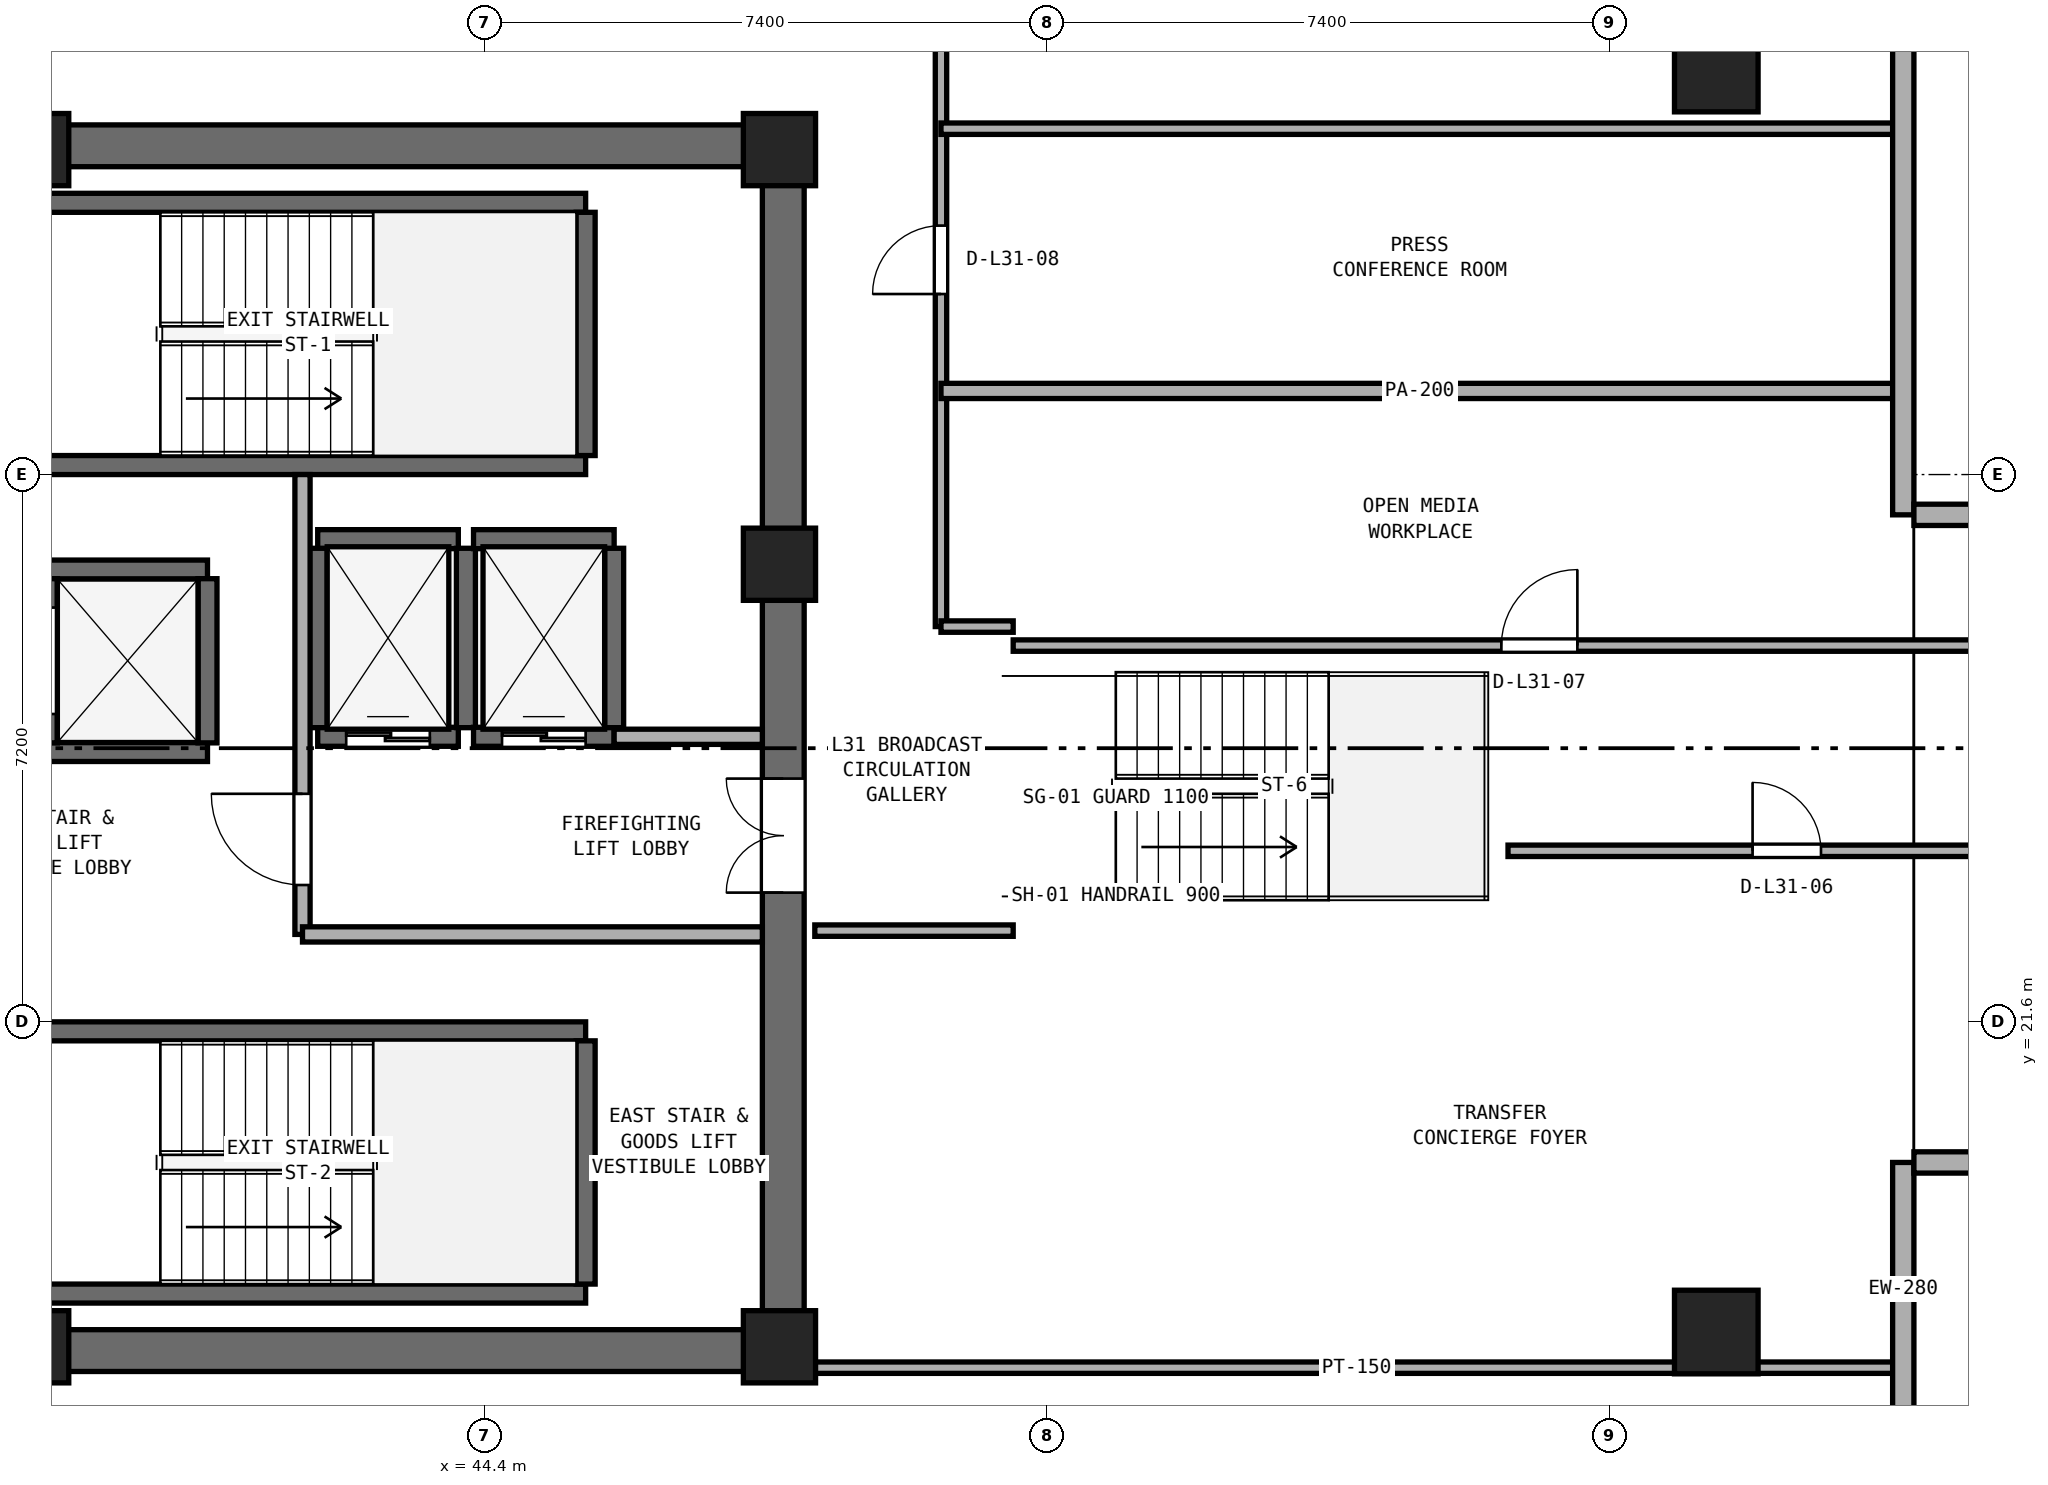
"""IFC4 building model, lengths in metres.
Left out: names, types, materials, properties, quantities, classifications, styles, units other than length and angle.
Written with IfcOpenShell. Run it as: python <this file> out.ifc"""

import sys

from ifc_helpers import new_model, si_unit, direction, frame, frame_2d, origin, origin_2d, place, context, subcontext, project, spatial, rectangle, extrude, element, fill, save


model = new_model("IFC4")
c1 = context("Model", 3, precision=1e-05, world=origin(), true_north=direction((0.0, 1.0)))
c2 = subcontext(c1, "Body", "Model", "MODEL_VIEW")
j1 = project(units=[si_unit("LENGTHUNIT", "METRE"), si_unit("PLANEANGLEUNIT", "RADIAN")], contexts=[c1])
p1 = place(None, origin())
s1 = spatial("IfcSite", under=j1, at=p1, CompositionType="ELEMENT")
p2 = place(p1, origin())
s2 = spatial("IfcBuilding", under=s1, at=p2, CompositionType="ELEMENT")
p3 = place(p2, frame((0.0, 0.0, 125.0)))
s3 = spatial("IfcBuildingStorey", under=s2, at=p3, CompositionType="ELEMENT", Elevation=125.0)
for number, where, z_axis, x_axis in (
    (1, (25.4, 17.275, 0.0), (0.0, 0.0, 1.0), (1.0, 0.0, 0.0)),
    (2, (25.4, 33.125, 0.0), (0.0, 0.0, 1.0), (1.0, 0.0, 0.0)),
):
    element("IfcWall", number, at=place(p3, frame(where, z_axis=z_axis, x_axis=x_axis)), inside=s3, PredefinedType="SHEAR", context=c2, shape_type="SweptSolid", body=[
        extrude(rectangle(XDim=23.2, YDim=0.55, at=frame_2d((11.6, 0.0))), origin(), (0.0, 0.0, 1.0), 3.54),
    ])
p4 = place(p3, frame((48.325, 17.55, 0.0), z_axis=(0.0, 0.0, 1.0), x_axis=(0.0, 1.0, 0.0)))
e3 = element("IfcWall", 3, at=p4, inside=s3, PredefinedType="SHEAR", context=c2, shape_type="SweptSolid", body=[
    extrude(rectangle(XDim=15.3, YDim=0.55, at=frame_2d((7.65, 0.0))), origin(), (0.0, 0.0, 1.0), 3.54),
])
p5 = place(p4, frame((5.75, 0.0, 0.0)))
e4 = element("IfcOpeningElement", 4, at=p5, cuts=e3, PredefinedType="OPENING", context=c2, shape_type="SweptSolid", body=[
    extrude(rectangle(XDim=1.5, YDim=2.15, at=frame_2d((0.75, 1.075))), frame((0.0, 0.285, 0.0), z_axis=(0.0, -1.0, 0.0), x_axis=(1.0, 0.0, 0.0)), (0.0, 0.0, 1.0), 0.57),
])
for number, where, z_axis, x_axis in (
    (5, (38.45, 17.325, 0.0), (0.0, 0.0, 1.0), (1.0, 0.0, 0.0)),
    (6, (48.275, 17.325, 0.0), (0.0, 0.0, 1.0), (1.0, 0.0, 0.0)),
    (7, (48.275, 27.62, 0.0), (0.0, 0.0, 1.0), (1.0, 0.0, 0.0)),
    (8, (48.275, 33.075, 0.0), (0.0, 0.0, 1.0), (1.0, 0.0, 0.0)),
    (9, (38.45, 33.075, 0.0), (0.0, 0.0, 1.0), (1.0, 0.0, 0.0)),
):
    element("IfcColumn", number, at=place(p3, frame(where, z_axis=z_axis, x_axis=x_axis)), inside=s3, PredefinedType="PILASTER", context=c2, shape_type="SweptSolid", body=[
        extrude(rectangle(XDim=0.95, YDim=0.95, at=origin_2d()), origin(), (0.0, 0.0, 1.0), 3.8),
    ])
for number, where, z_axis, x_axis in (
    (10, (60.6, 17.519, 0.0), (0.0, 0.0, 1.0), (1.0, 0.0, 0.0)),
    (11, (60.6, 34.122, 0.0), (0.0, 0.0, 1.0), (1.0, 0.0, 0.0)),
):
    element("IfcColumn", number, at=place(p3, frame(where, z_axis=z_axis, x_axis=x_axis)), inside=s3, PredefinedType="COLUMN", context=c2, shape_type="SweptSolid", body=[
        extrude(rectangle(XDim=1.1, YDim=1.1, at=origin_2d()), origin(), (0.0, 0.0, 1.0), 3.8),
    ])
for number, where, z_axis, x_axis in (
    (12, (38.425, 28.925, 0.0), (0.0, 0.0, 1.0), (1.0, 0.0, 0.0)),
    (13, (38.425, 32.375, 0.0), (0.0, 0.0, 1.0), (1.0, 0.0, 0.0)),
):
    element("IfcWall", number, at=place(p3, frame(where, z_axis=z_axis, x_axis=x_axis)), inside=s3, PredefinedType="SHEAR", context=c2, shape_type="SweptSolid", body=[
        extrude(rectangle(XDim=7.3, YDim=0.25, at=frame_2d((3.65, 0.0))), origin(), (0.0, 0.0, 1.0), 3.54),
    ])
p6 = place(p3, frame((45.725, 29.05, 0.0), z_axis=(0.0, 0.0, 1.0), x_axis=(0.0, 1.0, 0.0)))
e14 = element("IfcWall", 14, at=p6, inside=s3, PredefinedType="SHEAR", context=c2, shape_type="SweptSolid", body=[
    extrude(rectangle(XDim=3.2, YDim=0.25, at=frame_2d((1.6, 0.0))), origin(), (0.0, 0.0, 1.0), 3.54),
])
for number, where, z_axis, x_axis in (
    (15, (38.425, 18.025, 0.0), (0.0, 0.0, 1.0), (1.0, 0.0, 0.0)),
    (16, (38.425, 21.475, 0.0), (0.0, 0.0, 1.0), (1.0, 0.0, 0.0)),
):
    element("IfcWall", number, at=place(p3, frame(where, z_axis=z_axis, x_axis=x_axis)), inside=s3, PredefinedType="SHEAR", context=c2, shape_type="SweptSolid", body=[
        extrude(rectangle(XDim=7.3, YDim=0.25, at=frame_2d((3.65, 0.0))), origin(), (0.0, 0.0, 1.0), 3.54),
    ])
p7 = place(p3, frame((45.725, 18.15, 0.0), z_axis=(0.0, 0.0, 1.0), x_axis=(0.0, 1.0, 0.0)))
e17 = element("IfcWall", 17, at=p7, inside=s3, PredefinedType="SHEAR", context=c2, shape_type="SweptSolid", body=[
    extrude(rectangle(XDim=3.2, YDim=0.25, at=frame_2d((1.6, 0.0))), origin(), (0.0, 0.0, 1.0), 3.54),
])
p8 = place(p3, frame((42.2, 25.35, 0.0), z_axis=(0.0, 0.0, 1.0), x_axis=(1.0, 0.0, 0.0)))
e18 = element("IfcWall", 18, at=p8, inside=s3, PredefinedType="SHEAR", context=c2, shape_type="SweptSolid", body=[
    extrude(rectangle(XDim=1.85, YDim=0.25, at=frame_2d((0.925, 0.0))), origin(), (0.0, 0.0, 1.0), 3.54),
])
p9 = place(p8, frame((0.375, 0.0, 0.0)))
e19 = element("IfcOpeningElement", 19, at=p9, cuts=e18, PredefinedType="OPENING", context=c2, shape_type="SweptSolid", body=[
    extrude(rectangle(XDim=1.1, YDim=2.15, at=frame_2d((0.55, 1.075))), frame((0.0, 0.135, 0.0), z_axis=(0.0, -1.0, 0.0), x_axis=(1.0, 0.0, 0.0)), (0.0, 0.0, 1.0), 0.27),
])
p10 = place(p3, frame((42.2, 27.95, 0.0), z_axis=(0.0, 0.0, 1.0), x_axis=(1.0, 0.0, 0.0)))
e20 = element("IfcWall", 20, at=p10, inside=s3, PredefinedType="SHEAR", context=c2, shape_type="SweptSolid", body=[
    extrude(rectangle(XDim=1.85, YDim=0.25, at=frame_2d((0.925, 0.0))), origin(), (0.0, 0.0, 1.0), 3.54),
])
for number, where, z_axis, x_axis in (
    (21, (42.2, 25.47, 0.0), (0.0, 0.0, 1.0), (0.0, 1.0, 0.0)),
    (22, (44.15, 25.47, 0.0), (0.0, 0.0, 1.0), (0.0, 1.0, 0.0)),
):
    element("IfcWall", number, at=place(p3, frame(where, z_axis=z_axis, x_axis=x_axis)), inside=s3, PredefinedType="SHEAR", context=c2, shape_type="SweptSolid", body=[
        extrude(rectangle(XDim=2.36, YDim=0.25, at=frame_2d((1.18, 0.0))), origin(), (0.0, 0.0, 1.0), 3.54),
    ])
p11 = place(p3, frame((44.25, 25.35, 0.0), z_axis=(0.0, 0.0, 1.0), x_axis=(1.0, 0.0, 0.0)))
e23 = element("IfcWall", 23, at=p11, inside=s3, PredefinedType="SHEAR", context=c2, shape_type="SweptSolid", body=[
    extrude(rectangle(XDim=1.85, YDim=0.25, at=frame_2d((0.925, 0.0))), origin(), (0.0, 0.0, 1.0), 3.54),
])
p12 = place(p11, frame((0.375, 0.0, 0.0)))
e24 = element("IfcOpeningElement", 24, at=p12, cuts=e23, PredefinedType="OPENING", context=c2, shape_type="SweptSolid", body=[
    extrude(rectangle(XDim=1.1, YDim=2.15, at=frame_2d((0.55, 1.075))), frame((0.0, 0.135, 0.0), z_axis=(0.0, -1.0, 0.0), x_axis=(1.0, 0.0, 0.0)), (0.0, 0.0, 1.0), 0.27),
])
p13 = place(p3, frame((44.25, 27.95, 0.0), z_axis=(0.0, 0.0, 1.0), x_axis=(1.0, 0.0, 0.0)))
e25 = element("IfcWall", 25, at=p13, inside=s3, PredefinedType="SHEAR", context=c2, shape_type="SweptSolid", body=[
    extrude(rectangle(XDim=1.85, YDim=0.25, at=frame_2d((0.925, 0.0))), origin(), (0.0, 0.0, 1.0), 3.54),
])
p14 = place(p3, frame((46.1, 25.47, 0.0), z_axis=(0.0, 0.0, 1.0), x_axis=(0.0, 1.0, 0.0)))
e26 = element("IfcWall", 26, at=p14, inside=s3, PredefinedType="SHEAR", context=c2, shape_type="SweptSolid", body=[
    extrude(rectangle(XDim=2.36, YDim=0.25, at=frame_2d((1.18, 0.0))), origin(), (0.0, 0.0, 1.0), 3.54),
])
for number, where, z_axis, x_axis in (
    (27, (38.65, 25.15, 0.0), (0.0, 0.0, 1.0), (1.0, 0.0, 0.0)),
    (28, (38.65, 27.55, 0.0), (0.0, 0.0, 1.0), (1.0, 0.0, 0.0)),
):
    element("IfcWall", number, at=place(p3, frame(where, z_axis=z_axis, x_axis=x_axis)), inside=s3, PredefinedType="SHEAR", context=c2, shape_type="SweptSolid", body=[
        extrude(rectangle(XDim=2.1, YDim=0.25, at=frame_2d((1.05, 0.0))), origin(), (0.0, 0.0, 1.0), 3.54),
    ])
p15 = place(p3, frame((38.65, 25.27, 0.0), z_axis=(0.0, 0.0, 1.0), x_axis=(0.0, 1.0, 0.0)))
e29 = element("IfcWall", 29, at=p15, inside=s3, PredefinedType="SHEAR", context=c2, shape_type="SweptSolid", body=[
    extrude(rectangle(XDim=2.16, YDim=0.25, at=frame_2d((1.08, 0.0))), origin(), (0.0, 0.0, 1.0), 3.54),
])
p16 = place(p15, frame((0.38, 0.0, 0.0)))
e30 = element("IfcOpeningElement", 30, at=p16, cuts=e29, PredefinedType="OPENING", context=c2, shape_type="SweptSolid", body=[
    extrude(rectangle(XDim=1.4, YDim=2.2, at=frame_2d((0.7, 1.1))), frame((0.0, 0.135, 0.0), z_axis=(0.0, -1.0, 0.0), x_axis=(1.0, 0.0, 0.0)), (0.0, 0.0, 1.0), 0.27),
])
p17 = place(p3, frame((40.75, 25.27, 0.0), z_axis=(0.0, 0.0, 1.0), x_axis=(0.0, 1.0, 0.0)))
e31 = element("IfcWall", 31, at=p17, inside=s3, PredefinedType="SHEAR", context=c2, shape_type="SweptSolid", body=[
    extrude(rectangle(XDim=2.16, YDim=0.25, at=frame_2d((1.08, 0.0))), origin(), (0.0, 0.0, 1.0), 3.54),
])
p18 = place(p3, frame((42.0, 22.75, 0.0), z_axis=(0.0, 0.0, 1.0), x_axis=(0.0, 1.0, 0.0)))
e32 = element("IfcWall", 32, at=p18, inside=s3, PredefinedType="SOLIDWALL", context=c2, shape_type="SweptSolid", body=[
    extrude(rectangle(XDim=6.05, YDim=0.2, at=frame_2d((3.025, 0.0))), origin(), (0.0, 0.0, 1.0), 3.54),
])
p19 = place(p18, frame((0.65, 0.0, 0.0)))
e33 = element("IfcOpeningElement", 33, at=p19, cuts=e32, PredefinedType="OPENING", context=c2, shape_type="SweptSolid", body=[
    extrude(rectangle(XDim=1.2, YDim=2.15, at=frame_2d((0.6, 1.075))), frame((0.0, 0.11, 0.0), z_axis=(0.0, -1.0, 0.0), x_axis=(1.0, 0.0, 0.0)), (0.0, 0.0, 1.0), 0.22),
])
p20 = place(p3, frame((42.0, 22.75, 0.0), z_axis=(0.0, 0.0, 1.0), x_axis=(1.0, 0.0, 0.0)))
e34 = element("IfcWall", 34, at=p20, inside=s3, PredefinedType="SOLIDWALL", context=c2, shape_type="SweptSolid", body=[
    extrude(rectangle(XDim=6.05, YDim=0.2, at=frame_2d((3.025, 0.0))), origin(), (0.0, 0.0, 1.0), 3.54),
])
p21 = place(p3, frame((46.1, 25.35, 0.0), z_axis=(0.0, 0.0, 1.0), x_axis=(1.0, 0.0, 0.0)))
e35 = element("IfcWall", 35, at=p21, inside=s3, PredefinedType="SOLIDWALL", context=c2, shape_type="SweptSolid", body=[
    extrude(rectangle(XDim=1.95, YDim=0.2, at=frame_2d((0.975, 0.0))), origin(), (0.0, 0.0, 1.0), 3.54),
])
p22 = place(p3, frame((50.4, 26.8, 0.0), z_axis=(0.0, 0.0, 1.0), x_axis=(0.0, 1.0, 0.0)))
e36 = element("IfcWall", 36, at=p22, inside=s3, PredefinedType="PARTITIONING", context=c2, shape_type="SweptSolid", body=[
    extrude(rectangle(XDim=8.4, YDim=0.15, at=frame_2d((4.2, 0.0))), origin(), (0.0, 0.0, 1.0), 3.54),
])
p23 = place(p22, frame((4.375, 0.0, 0.0)))
e37 = element("IfcOpeningElement", 37, at=p23, cuts=e36, PredefinedType="OPENING", context=c2, shape_type="SweptSolid", body=[
    extrude(rectangle(XDim=0.9, YDim=2.1, at=frame_2d((0.45, 1.05))), frame((0.0, 0.085, 0.0), z_axis=(0.0, -1.0, 0.0), x_axis=(1.0, 0.0, 0.0)), (0.0, 0.0, 1.0), 0.17),
])
p24 = place(p3, frame((48.74, 17.05, 0.0), z_axis=(0.0, 0.0, 1.0), x_axis=(1.0, 0.0, 0.0)))
e38 = element("IfcWall", 38, at=p24, inside=s3, PredefinedType="PARTITIONING", context=c2, shape_type="SweptSolid", body=[
    extrude(rectangle(XDim=14.255, YDim=0.15, at=frame_2d((7.127, 0.0))), origin(), (0.0, 0.0, 1.0), 2.79),
])
p25 = place(p3, frame((48.74, 22.8, 0.0), z_axis=(0.0, 0.0, 1.0), x_axis=(1.0, 0.0, 0.0)))
e39 = element("IfcWall", 39, at=p25, inside=s3, PredefinedType="PARTITIONING", context=c2, shape_type="SweptSolid", body=[
    extrude(rectangle(XDim=2.61, YDim=0.15, at=frame_2d((1.305, 0.0))), origin(), (0.0, 0.0, 1.0), 3.54),
])
p26 = place(p3, frame((57.86, 23.85, 0.0), z_axis=(0.0, 0.0, 1.0), x_axis=(1.0, 0.0, 0.0)))
e40 = element("IfcWall", 40, at=p26, inside=s3, PredefinedType="PARTITIONING", context=c2, shape_type="SweptSolid", body=[
    extrude(rectangle(XDim=7.335, YDim=0.15, at=frame_2d((3.667, 0.0))), origin(), (0.0, 0.0, 1.0), 3.54),
])
p27 = place(p26, frame((3.218, 0.0, 0.0)))
e41 = element("IfcOpeningElement", 41, at=p27, cuts=e40, PredefinedType="OPENING", context=c2, shape_type="SweptSolid", body=[
    extrude(rectangle(XDim=0.9, YDim=2.1, at=frame_2d((0.45, 1.05))), frame((0.0, 0.085, 0.0), z_axis=(0.0, -1.0, 0.0), x_axis=(1.0, 0.0, 0.0)), (0.0, 0.0, 1.0), 0.17),
])
p28 = place(p3, frame((51.35, 26.55, 0.0), z_axis=(0.0, 0.0, 1.0), x_axis=(1.0, 0.0, 0.0)))
e42 = element("IfcWall", 42, at=p28, inside=s3, PredefinedType="PARTITIONING", context=c2, shape_type="SweptSolid", body=[
    extrude(rectangle(XDim=13.845, YDim=0.15, at=frame_2d((6.922, 0.0))), origin(), (0.0, 0.0, 1.0), 3.54),
])
p29 = place(p28, frame((6.423, 0.0, 0.0)))
e43 = element("IfcOpeningElement", 43, at=p29, cuts=e42, PredefinedType="OPENING", context=c2, shape_type="SweptSolid", body=[
    extrude(rectangle(XDim=1.0, YDim=2.12, at=frame_2d((0.5, 1.06))), frame((0.0, 0.085, 0.0), z_axis=(0.0, -1.0, 0.0), x_axis=(1.0, 0.0, 0.0)), (0.0, 0.0, 1.0), 0.17),
])
p30 = place(p3, frame((50.4, 26.8, 0.0), z_axis=(0.0, 0.0, 1.0), x_axis=(1.0, 0.0, 0.0)))
e44 = element("IfcWall", 44, at=p30, inside=s3, PredefinedType="PARTITIONING", context=c2, shape_type="SweptSolid", body=[
    extrude(rectangle(XDim=0.95, YDim=0.15, at=frame_2d((0.475, 0.0))), origin(), (0.0, 0.0, 1.0), 3.54),
])
p31 = place(p3, frame((50.4, 29.9, 0.0), z_axis=(0.0, 0.0, 1.0), x_axis=(1.0, 0.0, 0.0)))
e45 = element("IfcWall", 45, at=p31, inside=s3, PredefinedType="PARTITIONING", context=c2, shape_type="SweptSolid", body=[
    extrude(rectangle(XDim=12.595, YDim=0.2, at=frame_2d((6.298, 0.0))), origin(), (0.0, 0.0, 1.0), 3.54),
])
p32 = place(p3, frame((50.4, 33.35, 0.0), z_axis=(0.0, 0.0, 1.0), x_axis=(1.0, 0.0, 0.0)))
e46 = element("IfcWall", 46, at=p32, inside=s3, PredefinedType="PARTITIONING", context=c2, shape_type="SweptSolid", body=[
    extrude(rectangle(XDim=12.595, YDim=0.15, at=frame_2d((6.298, 0.0))), origin(), (0.0, 0.0, 1.0), 2.923),
])
p33 = place(p3, frame((63.06, 16.418, 0.0), z_axis=(0.0, 0.0, 1.0), x_axis=(0.0, 1.0, 0.0)))
e47 = element("IfcWall", 47, at=p33, inside=s3, PredefinedType="STANDARD", context=c2, shape_type="SweptSolid", body=[
    extrude(rectangle(XDim=3.332, YDim=0.28, at=frame_2d((1.666, 0.0))), origin(), (0.0, 0.0, 1.0), 3.54),
])
p34 = place(p3, frame((63.06, 28.27, 0.0), z_axis=(0.0, 0.0, 1.0), x_axis=(0.0, 1.0, 0.0)))
e48 = element("IfcWall", 48, at=p34, inside=s3, PredefinedType="STANDARD", context=c2, shape_type="SweptSolid", body=[
    extrude(rectangle(XDim=6.96, YDim=0.28, at=frame_2d((3.48, 0.0))), origin(), (0.0, 0.0, 1.0), 3.54),
])
p35 = place(p3, frame((63.2, 19.75, 0.0), z_axis=(0.0, 0.0, 1.0), x_axis=(1.0, 0.0, 0.0)))
e49 = element("IfcWall", 49, at=p35, inside=s3, PredefinedType="STANDARD", context=c2, shape_type="SweptSolid", body=[
    extrude(rectangle(XDim=2.2, YDim=0.28, at=frame_2d((1.1, 0.0))), origin(), (0.0, 0.0, 1.0), 2.847),
])
p36 = place(p3, frame((63.2, 28.27, 0.0), z_axis=(0.0, 0.0, 1.0), x_axis=(1.0, 0.0, 0.0)))
e50 = element("IfcWall", 50, at=p36, inside=s3, PredefinedType="STANDARD", context=c2, shape_type="SweptSolid", body=[
    extrude(rectangle(XDim=2.2, YDim=0.28, at=frame_2d((1.1, 0.0))), origin(), (0.0, 0.0, 1.0), 3.54),
])
p37 = place(p9, origin())
e51 = element("IfcDoor", 51, at=p37, inside=s3, OperationType="DOUBLE_DOOR_SLIDING", PredefinedType="DOOR", context=c2, shape_type="SweptSolid", body=[
    extrude(rectangle(XDim=1.1, YDim=2.15, at=frame_2d((0.55, 1.075))), frame((0.0, 0.025, 0.0), z_axis=(0.0, -1.0, 0.0), x_axis=(1.0, 0.0, 0.0)), (0.0, 0.0, 1.0), 0.05),
])
fill(e19, e51)
p38 = place(p12, origin())
e52 = element("IfcDoor", 52, at=p38, inside=s3, OperationType="DOUBLE_DOOR_SLIDING", PredefinedType="DOOR", context=c2, shape_type="SweptSolid", body=[
    extrude(rectangle(XDim=1.1, YDim=2.15, at=frame_2d((0.55, 1.075))), frame((0.0, 0.025, 0.0), z_axis=(0.0, -1.0, 0.0), x_axis=(1.0, 0.0, 0.0)), (0.0, 0.0, 1.0), 0.05),
])
fill(e24, e52)
p39 = place(p19, origin())
e53 = element("IfcDoor", 53, at=p39, inside=s3, OperationType="SINGLE_SWING_RIGHT", PredefinedType="DOOR", context=c2, shape_type="SweptSolid", body=[
    extrude(rectangle(XDim=1.2, YDim=2.15, at=frame_2d((0.6, 1.075))), frame((0.0, 0.025, 0.0), z_axis=(0.0, -1.0, 0.0), x_axis=(1.0, 0.0, 0.0)), (0.0, 0.0, 1.0), 0.05),
])
fill(e33, e53)
p40 = place(p5, origin())
e54 = element("IfcDoor", 54, at=p40, inside=s3, OperationType="DOUBLE_DOOR_SINGLE_SWING", PredefinedType="DOOR", context=c2, shape_type="SweptSolid", body=[
    extrude(rectangle(XDim=1.5, YDim=2.15, at=frame_2d((0.75, 1.075))), frame((0.0, 0.025, 0.0), z_axis=(0.0, -1.0, 0.0), x_axis=(1.0, 0.0, 0.0)), (0.0, 0.0, 1.0), 0.05),
])
fill(e4, e54)
p41 = place(p27, origin())
e55 = element("IfcDoor", 55, at=p41, inside=s3, OperationType="SINGLE_SWING_LEFT", PredefinedType="DOOR", context=c2, shape_type="SweptSolid", body=[
    extrude(rectangle(XDim=0.9, YDim=2.1, at=frame_2d((0.45, 1.05))), frame((0.0, 0.025, 0.0), z_axis=(0.0, -1.0, 0.0), x_axis=(1.0, 0.0, 0.0)), (0.0, 0.0, 1.0), 0.05),
])
fill(e41, e55)
p42 = place(p29, origin())
e56 = element("IfcDoor", 56, at=p42, inside=s3, OperationType="SINGLE_SWING_RIGHT", PredefinedType="DOOR", context=c2, shape_type="SweptSolid", body=[
    extrude(rectangle(XDim=1.0, YDim=2.12, at=frame_2d((0.5, 1.06))), frame((0.0, 0.025, 0.0), z_axis=(0.0, -1.0, 0.0), x_axis=(1.0, 0.0, 0.0)), (0.0, 0.0, 1.0), 0.05),
])
fill(e43, e56)
p43 = place(p23, origin())
e57 = element("IfcDoor", 57, at=p43, inside=s3, OperationType="SINGLE_SWING_LEFT", PredefinedType="DOOR", context=c2, shape_type="SweptSolid", body=[
    extrude(rectangle(XDim=0.9, YDim=2.1, at=frame_2d((0.45, 1.05))), frame((0.0, 0.025, 0.0), z_axis=(0.0, -1.0, 0.0), x_axis=(1.0, 0.0, 0.0)), (0.0, 0.0, 1.0), 0.05),
])
fill(e37, e57)
save(model, sys.argv[1])
